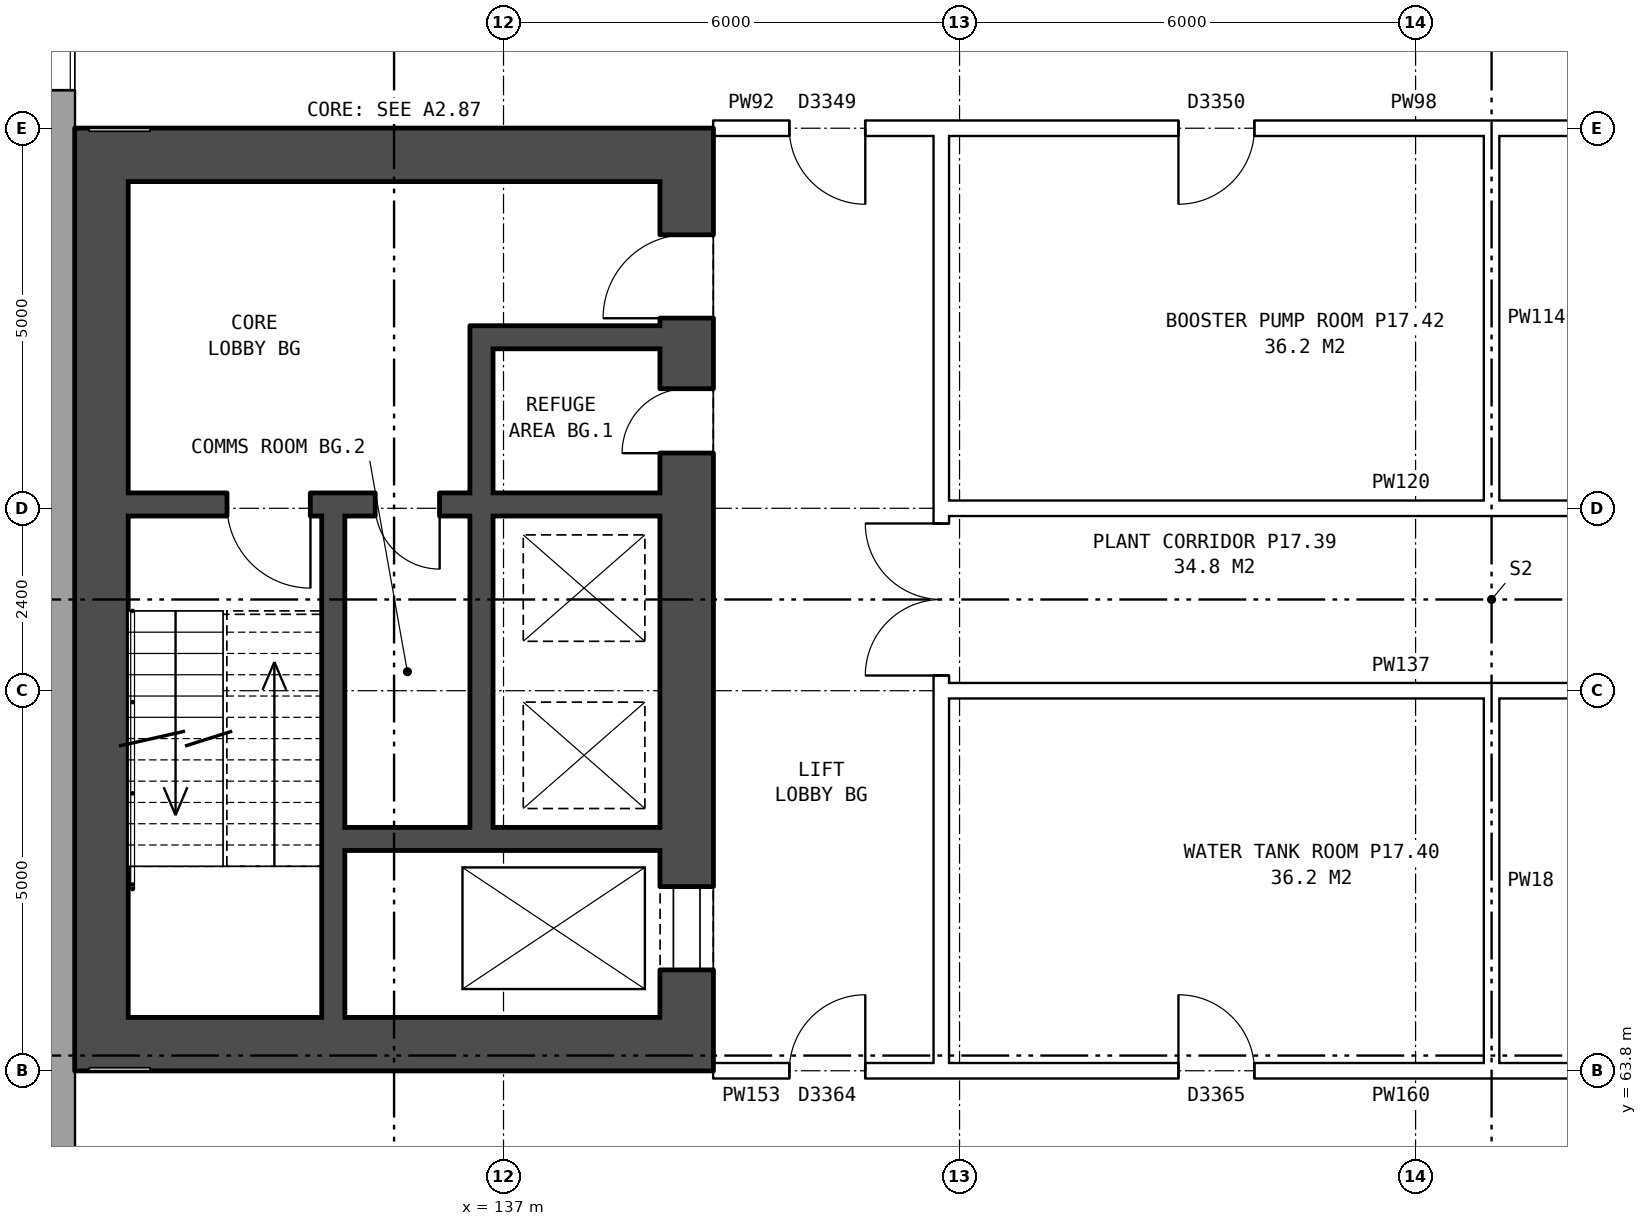
"""IFC4 building model, lengths in metres.
Left out: names, types, materials, properties, quantities, classifications, styles, units other than length and angle.
Written with IfcOpenShell. Run it as: python <this file> out.ifc"""

import sys

from ifc_helpers import new_model, si_unit, direction, frame, frame_2d, origin, place, context, subcontext, project, spatial, rectangle, extrude, element, fill, save


model = new_model("IFC4")
c1 = context("Model", 3, precision=1e-05, world=origin(), true_north=direction((0.0, 1.0)))
c2 = subcontext(c1, "Body", "Model", "MODEL_VIEW")
j1 = project(units=[si_unit("LENGTHUNIT", "METRE"), si_unit("PLANEANGLEUNIT", "RADIAN")], contexts=[c1])
p1 = place(None, origin())
s1 = spatial("IfcSite", under=j1, at=p1, CompositionType="ELEMENT")
p2 = place(p1, origin())
s2 = spatial("IfcBuilding", under=s1, at=p2, CompositionType="ELEMENT")
p3 = place(p2, frame((0.0, 0.0, 62.9)))
s3 = spatial("IfcBuildingStorey", under=s2, at=p3, CompositionType="ELEMENT", Elevation=62.9)
p4 = place(p3, frame((131.18, 82.925, 0.0), z_axis=(0.0, 0.0, 1.0), x_axis=(0.0, -1.0, 0.0)))
e1 = element("IfcWall", 1, at=p4, inside=s3, PredefinedType="STANDARD", context=c2, shape_type="SweptSolid", body=[
    extrude(rectangle(XDim=25.851, YDim=0.36, at=frame_2d((12.925, 0.0))), origin(), (0.0, 0.0, 1.0), 4.2),
])
p5 = place(p4, frame((2.9, 0.0, 1.5)))
e2 = element("IfcOpeningElement", 2, at=p5, cuts=e1, PredefinedType="OPENING", context=c2, shape_type="SweptSolid", body=[
    extrude(rectangle(XDim=0.6, YDim=1.2, at=frame_2d((0.3, 0.6))), frame((0.0, 0.19, 0.0), z_axis=(0.0, -1.0, 0.0), x_axis=(1.0, 0.0, 0.0)), (0.0, 0.0, 1.0), 0.38),
])
p6 = place(p4, frame((4.625, 0.0, 1.5)))
e3 = element("IfcOpeningElement", 3, at=p6, cuts=e1, PredefinedType="OPENING", context=c2, shape_type="SweptSolid", body=[
    extrude(rectangle(XDim=1.6, YDim=1.2, at=frame_2d((0.8, 0.6))), frame((0.0, 0.19, 0.0), z_axis=(0.0, -1.0, 0.0), x_axis=(1.0, 0.0, 0.0)), (0.0, 0.0, 1.0), 0.38),
])
p7 = place(p4, frame((21.125, 0.0, 1.5)))
e4 = element("IfcOpeningElement", 4, at=p7, cuts=e1, PredefinedType="OPENING", context=c2, shape_type="SweptSolid", body=[
    extrude(rectangle(XDim=0.6, YDim=1.2, at=frame_2d((0.3, 0.6))), frame((0.0, 0.19, 0.0), z_axis=(0.0, -1.0, 0.0), x_axis=(1.0, 0.0, 0.0)), (0.0, 0.0, 1.0), 0.38),
])
p8 = place(p4, frame((22.325, 0.0, 1.5)))
e5 = element("IfcOpeningElement", 5, at=p8, cuts=e1, PredefinedType="OPENING", context=c2, shape_type="SweptSolid", body=[
    extrude(rectangle(XDim=0.6, YDim=1.2, at=frame_2d((0.3, 0.6))), frame((0.0, 0.19, 0.0), z_axis=(0.0, -1.0, 0.0), x_axis=(1.0, 0.0, 0.0)), (0.0, 0.0, 1.0), 0.38),
])
p9 = place(p3, frame((139.41, 64.5, 0.0), z_axis=(0.0, 0.0, 1.0), x_axis=(0.0, 1.0, 0.0)))
e6 = element("IfcWall", 6, at=p9, inside=s3, PredefinedType="SHEAR", context=c2, shape_type="SweptSolid", body=[
    extrude(rectangle(XDim=11.0, YDim=0.7, at=frame_2d((5.5, 0.0))), origin(), (0.0, 0.0, 1.0), 4.2),
])
p10 = place(p9, frame((0.625, 0.0, 0.0)))
e7 = element("IfcOpeningElement", 7, at=p10, cuts=e6, PredefinedType="OPENING", context=c2, shape_type="SweptSolid", body=[
    extrude(rectangle(XDim=1.1, YDim=2.1, at=frame_2d((0.55, 1.05))), frame((0.0, 0.36, 0.0), z_axis=(0.0, -1.0, 0.0), x_axis=(1.0, 0.0, 0.0)), (0.0, 0.0, 1.0), 0.72),
])
p11 = place(p9, frame((9.2, 0.0, 0.0)))
e8 = element("IfcOpeningElement", 8, at=p11, cuts=e6, PredefinedType="OPENING", context=c2, shape_type="SweptSolid", body=[
    extrude(rectangle(XDim=1.1, YDim=2.1, at=frame_2d((0.55, 1.05))), frame((0.0, 0.36, 0.0), z_axis=(0.0, -1.0, 0.0), x_axis=(1.0, 0.0, 0.0)), (0.0, 0.0, 1.0), 0.72),
])
p12 = place(p9, frame((7.425, 0.0, 0.0)))
e9 = element("IfcOpeningElement", 9, at=p12, cuts=e6, PredefinedType="OPENING", context=c2, shape_type="SweptSolid", body=[
    extrude(rectangle(XDim=0.85, YDim=2.1, at=frame_2d((0.425, 1.05))), frame((0.0, 0.36, 0.0), z_axis=(0.0, -1.0, 0.0), x_axis=(1.0, 0.0, 0.0)), (0.0, 0.0, 1.0), 0.72),
])
p13 = place(p3, frame((131.71, 64.5, 0.0), z_axis=(0.0, 0.0, 1.0), x_axis=(0.0, 1.0, 0.0)))
e10 = element("IfcWall", 10, at=p13, inside=s3, PredefinedType="SHEAR", context=c2, shape_type="SweptSolid", body=[
    extrude(rectangle(XDim=11.0, YDim=0.7, at=frame_2d((5.5, 0.0))), origin(), (0.0, 0.0, 1.0), 4.2),
])
for number, where, z_axis, x_axis in (
    (11, (139.76, 64.15, 0.0), (0.0, 0.0, 1.0), (-1.0, 0.0, 0.0)),
    (12, (139.76, 75.85, 0.0), (0.0, 0.0, 1.0), (-1.0, 0.0, 0.0)),
):
    element("IfcWall", number, at=place(p3, frame(where, z_axis=z_axis, x_axis=x_axis)), inside=s3, PredefinedType="SHEAR", context=c2, shape_type="SweptSolid", body=[
        extrude(rectangle(XDim=8.4, YDim=0.7, at=frame_2d((4.2, 0.0))), origin(), (0.0, 0.0, 1.0), 4.2),
    ])
p14 = place(p3, frame((139.06, 66.85, 0.0), z_axis=(0.0, 0.0, 1.0), x_axis=(-1.0, 0.0, 0.0)))
e13 = element("IfcWall", 13, at=p14, inside=s3, PredefinedType="SHEAR", context=c2, shape_type="SweptSolid", body=[
    extrude(rectangle(XDim=4.15, YDim=0.3, at=frame_2d((2.075, 0.0))), origin(), (0.0, 0.0, 1.0), 4.2),
])
p15 = place(p3, frame((139.06, 71.25, 0.0), z_axis=(0.0, 0.0, 1.0), x_axis=(-1.0, 0.0, 0.0)))
e14 = element("IfcWall", 14, at=p15, inside=s3, PredefinedType="SHEAR", context=c2, shape_type="SweptSolid", body=[
    extrude(rectangle(XDim=7.0, YDim=0.3, at=frame_2d((3.5, 0.0))), origin(), (0.0, 0.0, 1.0), 4.2),
])
p16 = place(p15, frame((4.6, 0.0, 0.0)))
e15 = element("IfcOpeningElement", 15, at=p16, cuts=e14, PredefinedType="OPENING", context=c2, shape_type="SweptSolid", body=[
    extrude(rectangle(XDim=1.1, YDim=2.1, at=frame_2d((0.55, 1.05))), frame((0.0, 0.16, 0.0), z_axis=(0.0, -1.0, 0.0), x_axis=(1.0, 0.0, 0.0)), (0.0, 0.0, 1.0), 0.32),
])
p17 = place(p15, frame((2.9, 0.0, 0.0)))
e16 = element("IfcOpeningElement", 16, at=p17, cuts=e14, PredefinedType="OPENING", context=c2, shape_type="SweptSolid", body=[
    extrude(rectangle(XDim=0.85, YDim=2.1, at=frame_2d((0.425, 1.05))), frame((0.0, 0.16, 0.0), z_axis=(0.0, -1.0, 0.0), x_axis=(1.0, 0.0, 0.0)), (0.0, 0.0, 1.0), 0.32),
])
p18 = place(p3, frame((139.06, 73.45, 0.0), z_axis=(0.0, 0.0, 1.0), x_axis=(-1.0, 0.0, 0.0)))
e17 = element("IfcWall", 17, at=p18, inside=s3, PredefinedType="SHEAR", context=c2, shape_type="SweptSolid", body=[
    extrude(rectangle(XDim=2.2, YDim=0.3, at=frame_2d((1.1, 0.0))), origin(), (0.0, 0.0, 1.0), 4.2),
])
p19 = place(p3, frame((136.71, 67.0, 0.0), z_axis=(0.0, 0.0, 1.0), x_axis=(0.0, 1.0, 0.0)))
e18 = element("IfcWall", 18, at=p19, inside=s3, PredefinedType="SHEAR", context=c2, shape_type="SweptSolid", body=[
    extrude(rectangle(XDim=4.1, YDim=0.3, at=frame_2d((2.05, 0.0))), origin(), (0.0, 0.0, 1.0), 4.2),
])
p20 = place(p3, frame((136.71, 71.4, 0.0), z_axis=(0.0, 0.0, 1.0), x_axis=(0.0, 1.0, 0.0)))
e19 = element("IfcWall", 19, at=p20, inside=s3, PredefinedType="SHEAR", context=c2, shape_type="SweptSolid", body=[
    extrude(rectangle(XDim=2.2, YDim=0.3, at=frame_2d((1.1, 0.0))), origin(), (0.0, 0.0, 1.0), 4.2),
])
p21 = place(p3, frame((134.76, 64.5, 0.0), z_axis=(0.0, 0.0, 1.0), x_axis=(0.0, 1.0, 0.0)))
e20 = element("IfcWall", 20, at=p21, inside=s3, PredefinedType="SHEAR", context=c2, shape_type="SweptSolid", body=[
    extrude(rectangle(XDim=6.6, YDim=0.3, at=frame_2d((3.3, 0.0))), origin(), (0.0, 0.0, 1.0), 4.2),
])
p22 = place(p3, frame((142.76, 63.9, 0.0), z_axis=(0.0, 0.0, 1.0), x_axis=(0.0, 1.0, 0.0)))
e21 = element("IfcWall", 21, at=p22, inside=s3, PredefinedType="PARTITIONING", context=c2, shape_type="SweptSolid", body=[
    extrude(rectangle(XDim=12.2, YDim=0.2, at=frame_2d((6.1, 0.0))), origin(), (0.0, 0.0, 1.0), 4.2),
])
p23 = place(p22, frame((5.1, 0.0, 0.0)))
e22 = element("IfcOpeningElement", 22, at=p23, cuts=e21, PredefinedType="OPENING", context=c2, shape_type="SweptSolid", body=[
    extrude(rectangle(XDim=2.0, YDim=2.1, at=frame_2d((1.0, 1.05))), frame((0.0, 0.11, 0.0), z_axis=(0.0, -1.0, 0.0), x_axis=(1.0, 0.0, 0.0)), (0.0, 0.0, 1.0), 0.22),
])
p24 = place(p3, frame((142.76, 63.8, 0.0), z_axis=(0.0, 0.0, 1.0), x_axis=(1.0, 0.0, 0.0)))
e23 = element("IfcWall", 23, at=p24, inside=s3, PredefinedType="PARTITIONING", context=c2, shape_type="SweptSolid", body=[
    extrude(rectangle(XDim=14.48, YDim=0.2, at=frame_2d((7.24, 0.0))), origin(), (0.0, 0.0, 1.0), 4.2),
])
p25 = place(p24, frame((3.12, 0.0, 0.0)))
e24 = element("IfcOpeningElement", 24, at=p25, cuts=e23, PredefinedType="OPENING", context=c2, shape_type="SweptSolid", body=[
    extrude(rectangle(XDim=1.0, YDim=2.1, at=frame_2d((0.5, 1.05))), frame((0.0, 0.11, 0.0), z_axis=(0.0, -1.0, 0.0), x_axis=(1.0, 0.0, 0.0)), (0.0, 0.0, 1.0), 0.22),
])
p26 = place(p24, frame((10.36, 0.0, 0.0)))
e25 = element("IfcOpeningElement", 25, at=p26, cuts=e23, PredefinedType="OPENING", context=c2, shape_type="SweptSolid", body=[
    extrude(rectangle(XDim=1.0, YDim=2.1, at=frame_2d((0.5, 1.05))), frame((0.0, 0.11, 0.0), z_axis=(0.0, -1.0, 0.0), x_axis=(1.0, 0.0, 0.0)), (0.0, 0.0, 1.0), 0.22),
])
p27 = place(p3, frame((139.76, 63.8, 0.0), z_axis=(0.0, 0.0, 1.0), x_axis=(1.0, 0.0, 0.0)))
e26 = element("IfcWall", 26, at=p27, inside=s3, PredefinedType="PARTITIONING", context=c2, shape_type="SweptSolid", body=[
    extrude(rectangle(XDim=3.0, YDim=0.2, at=frame_2d((1.5, 0.0))), origin(), (0.0, 0.0, 1.0), 4.2),
])
p28 = place(p27, frame((1.0, 0.0, 0.0)))
e27 = element("IfcOpeningElement", 27, at=p28, cuts=e26, PredefinedType="OPENING", context=c2, shape_type="SweptSolid", body=[
    extrude(rectangle(XDim=1.0, YDim=2.1, at=frame_2d((0.5, 1.05))), frame((0.0, 0.11, 0.0), z_axis=(0.0, -1.0, 0.0), x_axis=(1.0, 0.0, 0.0)), (0.0, 0.0, 1.0), 0.22),
])
for number, where, z_axis, x_axis in (
    (28, (142.76, 68.8, 0.0), (0.0, 0.0, 1.0), (1.0, 0.0, 0.0)),
    (29, (142.76, 71.2, 0.0), (0.0, 0.0, 1.0), (1.0, 0.0, 0.0)),
):
    element("IfcWall", number, at=place(p3, frame(where, z_axis=z_axis, x_axis=x_axis)), inside=s3, PredefinedType="PARTITIONING", context=c2, shape_type="SweptSolid", body=[
        extrude(rectangle(XDim=14.48, YDim=0.2, at=frame_2d((7.24, 0.0))), origin(), (0.0, 0.0, 1.0), 4.2),
    ])
p29 = place(p3, frame((142.76, 76.2, 0.0), z_axis=(0.0, 0.0, 1.0), x_axis=(1.0, 0.0, 0.0)))
e30 = element("IfcWall", 30, at=p29, inside=s3, PredefinedType="PARTITIONING", context=c2, shape_type="SweptSolid", body=[
    extrude(rectangle(XDim=14.48, YDim=0.2, at=frame_2d((7.24, 0.0))), origin(), (0.0, 0.0, 1.0), 4.2),
])
p30 = place(p29, frame((3.12, 0.0, 0.0)))
e31 = element("IfcOpeningElement", 31, at=p30, cuts=e30, PredefinedType="OPENING", context=c2, shape_type="SweptSolid", body=[
    extrude(rectangle(XDim=1.0, YDim=2.1, at=frame_2d((0.5, 1.05))), frame((0.0, 0.11, 0.0), z_axis=(0.0, -1.0, 0.0), x_axis=(1.0, 0.0, 0.0)), (0.0, 0.0, 1.0), 0.22),
])
p31 = place(p29, frame((10.36, 0.0, 0.0)))
e32 = element("IfcOpeningElement", 32, at=p31, cuts=e30, PredefinedType="OPENING", context=c2, shape_type="SweptSolid", body=[
    extrude(rectangle(XDim=1.0, YDim=2.1, at=frame_2d((0.5, 1.05))), frame((0.0, 0.11, 0.0), z_axis=(0.0, -1.0, 0.0), x_axis=(1.0, 0.0, 0.0)), (0.0, 0.0, 1.0), 0.22),
])
p32 = place(p3, frame((139.76, 76.2, 0.0), z_axis=(0.0, 0.0, 1.0), x_axis=(1.0, 0.0, 0.0)))
e33 = element("IfcWall", 33, at=p32, inside=s3, PredefinedType="PARTITIONING", context=c2, shape_type="SweptSolid", body=[
    extrude(rectangle(XDim=3.0, YDim=0.2, at=frame_2d((1.5, 0.0))), origin(), (0.0, 0.0, 1.0), 4.2),
])
p33 = place(p32, frame((1.0, 0.0, 0.0)))
e34 = element("IfcOpeningElement", 34, at=p33, cuts=e33, PredefinedType="OPENING", context=c2, shape_type="SweptSolid", body=[
    extrude(rectangle(XDim=1.0, YDim=2.1, at=frame_2d((0.5, 1.05))), frame((0.0, 0.11, 0.0), z_axis=(0.0, -1.0, 0.0), x_axis=(1.0, 0.0, 0.0)), (0.0, 0.0, 1.0), 0.22),
])
for number, where, z_axis, x_axis in (
    (35, (150.0, 63.7, 0.0), (0.0, 0.0, 1.0), (0.0, 1.0, 0.0)),
    (36, (150.0, 71.1, 0.0), (0.0, 0.0, 1.0), (0.0, 1.0, 0.0)),
):
    element("IfcWall", number, at=place(p3, frame(where, z_axis=z_axis, x_axis=x_axis)), inside=s3, PredefinedType="PARTITIONING", context=c2, shape_type="SweptSolid", body=[
        extrude(rectangle(XDim=5.2, YDim=0.2, at=frame_2d((2.6, 0.0))), origin(), (0.0, 0.0, 1.0), 4.2),
    ])
p34 = place(p6, origin())
e37 = element("IfcWindow", 37, at=p34, inside=s3, PartitioningType="DOUBLE_PANEL_HORIZONTAL", PredefinedType="WINDOW", context=c2, shape_type="SweptSolid", body=[
    extrude(rectangle(XDim=1.6, YDim=1.2, at=frame_2d((0.8, 0.6))), frame((0.0, 0.15, 0.0), z_axis=(0.0, -1.0, 0.0), x_axis=(1.0, 0.0, 0.0)), (0.0, 0.0, 1.0), 0.06),
])
fill(e3, e37)
p35 = place(p10, origin())
e38 = element("IfcDoor", 38, at=p35, inside=s3, OperationType="DOUBLE_DOOR_SLIDING", PredefinedType="DOOR", context=c2, shape_type="SweptSolid", body=[
    extrude(rectangle(XDim=1.1, YDim=2.1, at=frame_2d((0.55, 1.05))), frame((0.0, 0.335, 0.0), z_axis=(0.0, -1.0, 0.0), x_axis=(1.0, 0.0, 0.0)), (0.0, 0.0, 1.0), 0.05),
])
fill(e7, e38)
p36 = place(p11, origin())
e39 = element("IfcDoor", 39, at=p36, inside=s3, OperationType="SINGLE_SWING_LEFT", PredefinedType="DOOR", context=c2, shape_type="SweptSolid", body=[
    extrude(rectangle(XDim=1.1, YDim=2.1, at=frame_2d((0.55, 1.05))), frame((0.0, 0.335, 0.0), z_axis=(0.0, -1.0, 0.0), x_axis=(1.0, 0.0, 0.0)), (0.0, 0.0, 1.0), 0.05),
])
fill(e8, e39)
p37 = place(p16, origin())
e40 = element("IfcDoor", 40, at=p37, inside=s3, OperationType="SINGLE_SWING_LEFT", PredefinedType="DOOR", context=c2, shape_type="SweptSolid", body=[
    extrude(rectangle(XDim=1.1, YDim=2.1, at=frame_2d((0.55, 1.05))), frame((0.0, 0.025, 0.0), z_axis=(0.0, -1.0, 0.0), x_axis=(1.0, 0.0, 0.0)), (0.0, 0.0, 1.0), 0.05),
])
fill(e15, e40)
p38 = place(p12, origin())
e41 = element("IfcDoor", 41, at=p38, inside=s3, OperationType="SINGLE_SWING_LEFT", PredefinedType="DOOR", context=c2, shape_type="SweptSolid", body=[
    extrude(rectangle(XDim=0.85, YDim=2.1, at=frame_2d((0.425, 1.05))), frame((0.0, 0.335, 0.0), z_axis=(0.0, -1.0, 0.0), x_axis=(1.0, 0.0, 0.0)), (0.0, 0.0, 1.0), 0.05),
])
fill(e9, e41)
p39 = place(p17, origin())
e42 = element("IfcDoor", 42, at=p39, inside=s3, OperationType="SINGLE_SWING_LEFT", PredefinedType="DOOR", context=c2, shape_type="SweptSolid", body=[
    extrude(rectangle(XDim=0.85, YDim=2.1, at=frame_2d((0.425, 1.05))), frame((0.0, 0.025, 0.0), z_axis=(0.0, -1.0, 0.0), x_axis=(1.0, 0.0, 0.0)), (0.0, 0.0, 1.0), 0.05),
])
fill(e16, e42)
p40 = place(p23, origin())
e43 = element("IfcDoor", 43, at=p40, inside=s3, OperationType="DOUBLE_DOOR_SINGLE_SWING", PredefinedType="DOOR", context=c2, shape_type="SweptSolid", body=[
    extrude(rectangle(XDim=2.0, YDim=2.1, at=frame_2d((1.0, 1.05))), frame((0.0, 0.025, 0.0), z_axis=(0.0, -1.0, 0.0), x_axis=(1.0, 0.0, 0.0)), (0.0, 0.0, 1.0), 0.05),
])
fill(e22, e43)
p41 = place(p25, origin())
e44 = element("IfcDoor", 44, at=p41, inside=s3, OperationType="SINGLE_SWING_LEFT", PredefinedType="DOOR", context=c2, shape_type="SweptSolid", body=[
    extrude(rectangle(XDim=1.0, YDim=2.1, at=frame_2d((0.5, 1.05))), frame((0.0, 0.025, 0.0), z_axis=(0.0, -1.0, 0.0), x_axis=(1.0, 0.0, 0.0)), (0.0, 0.0, 1.0), 0.05),
])
fill(e24, e44)
p42 = place(p28, origin())
e45 = element("IfcDoor", 45, at=p42, inside=s3, OperationType="SINGLE_SWING_RIGHT", PredefinedType="DOOR", context=c2, shape_type="SweptSolid", body=[
    extrude(rectangle(XDim=1.0, YDim=2.1, at=frame_2d((0.5, 1.05))), frame((0.0, 0.025, 0.0), z_axis=(0.0, -1.0, 0.0), x_axis=(1.0, 0.0, 0.0)), (0.0, 0.0, 1.0), 0.05),
])
fill(e27, e45)
p43 = place(p30, frame((1.0, 0.0, 0.0), z_axis=(0.0, 0.0, 1.0), x_axis=(-1.0, 0.0, 0.0)))
e46 = element("IfcDoor", 46, at=p43, inside=s3, OperationType="SINGLE_SWING_RIGHT", PredefinedType="DOOR", context=c2, shape_type="SweptSolid", body=[
    extrude(rectangle(XDim=1.0, YDim=2.1, at=frame_2d((0.5, 1.05))), frame((0.0, 0.025, 0.0), z_axis=(0.0, -1.0, 0.0), x_axis=(1.0, 0.0, 0.0)), (0.0, 0.0, 1.0), 0.05),
])
fill(e31, e46)
p44 = place(p33, frame((1.0, 0.0, 0.0), z_axis=(0.0, 0.0, 1.0), x_axis=(-1.0, 0.0, 0.0)))
e47 = element("IfcDoor", 47, at=p44, inside=s3, OperationType="SINGLE_SWING_LEFT", PredefinedType="DOOR", context=c2, shape_type="SweptSolid", body=[
    extrude(rectangle(XDim=1.0, YDim=2.1, at=frame_2d((0.5, 1.05))), frame((0.0, 0.025, 0.0), z_axis=(0.0, -1.0, 0.0), x_axis=(1.0, 0.0, 0.0)), (0.0, 0.0, 1.0), 0.05),
])
fill(e34, e47)
save(model, sys.argv[1])
